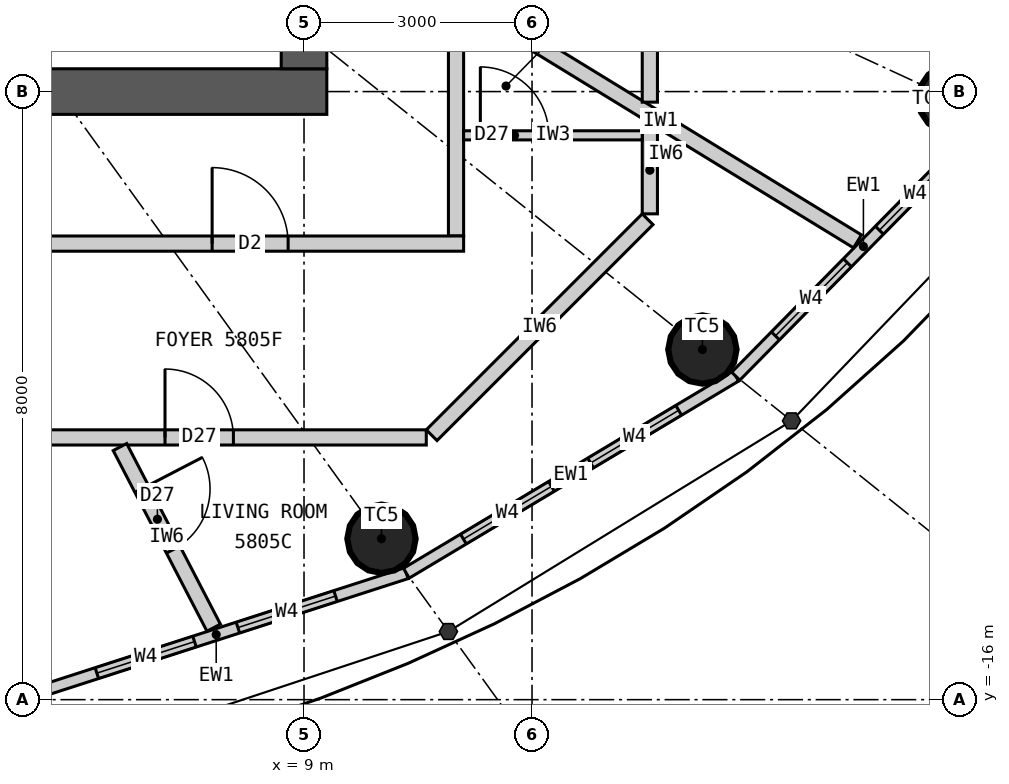
"""IFC4 building model, lengths in metres.
Left out: names, types, materials, properties, quantities, classifications, styles, units other than length and angle.
Written with IfcOpenShell. Run it as: python <this file> out.ifc"""

import sys

from ifc_helpers import new_model, si_unit, direction, frame, frame_2d, origin, origin_2d, place, context, subcontext, project, spatial, rectangle, circle, extrude, element, fill, save


model = new_model("IFC4")
c1 = context("Model", 3, precision=1e-05, world=origin(), true_north=direction((0.0, 1.0)))
c2 = subcontext(c1, "Body", "Model", "MODEL_VIEW")
j1 = project(units=[si_unit("LENGTHUNIT", "METRE"), si_unit("PLANEANGLEUNIT", "RADIAN")], contexts=[c1])
p1 = place(None, origin())
s1 = spatial("IfcSite", under=j1, at=p1, CompositionType="ELEMENT")
p2 = place(p1, origin())
s2 = spatial("IfcBuilding", under=s1, at=p2, CompositionType="ELEMENT")
p3 = place(p2, frame((0.0, 0.0, 216.0)))
s3 = spatial("IfcBuildingStorey", under=s2, at=p3, CompositionType="ELEMENT", Elevation=216.0)
for number, where, z_axis, x_axis in (
    (1, (10.019, -13.883, 0.0), (0.0, 0.0, 1.0), (1.0, 0.0, 0.0)),
    (2, (14.241, -11.393, 0.0), (0.0, 0.0, 1.0), (1.0, 0.0, 0.0)),
    (3, (17.532, -8.098, 0.0), (0.0, 0.0, 1.0), (1.0, 0.0, 0.0)),
):
    element("IfcColumn", number, at=place(p3, frame(where, z_axis=z_axis, x_axis=x_axis)), inside=s3, PredefinedType="COLUMN", context=c2, shape_type="SweptSolid", body=[
        extrude(circle(Radius=0.45, at=origin_2d()), origin(), (0.0, 0.0, 1.0), 3.3),
    ])
p4 = place(p3, frame((9.3, -8.0, 0.0), z_axis=(0.0, 0.0, 1.0), x_axis=(-1.0, 0.0, 0.0)))
e4 = element("IfcWall", 4, at=p4, inside=s3, PredefinedType="SHEAR", context=c2, shape_type="SweptSolid", body=[
    extrude(rectangle(XDim=18.6, YDim=0.6, at=frame_2d((9.3, 0.0))), origin(), (0.0, 0.0, 1.0), 3.3),
])
p5 = place(p4, frame((8.0, 0.0, 0.0)))
e5 = element("IfcOpeningElement", 5, at=p5, cuts=e4, PredefinedType="OPENING", context=c2, shape_type="SweptSolid", body=[
    extrude(rectangle(XDim=1.2, YDim=2.2, at=frame_2d((0.6, 1.1))), frame((0.0, 0.31, 0.0), z_axis=(0.0, -1.0, 0.0), x_axis=(1.0, 0.0, 0.0)), (0.0, 0.0, 1.0), 0.62),
])
p6 = place(p4, frame((15.6, 0.0, 0.0)))
e6 = element("IfcOpeningElement", 6, at=p6, cuts=e4, PredefinedType="OPENING", context=c2, shape_type="SweptSolid", body=[
    extrude(rectangle(XDim=0.9, YDim=2.2, at=frame_2d((0.45, 1.1))), frame((0.0, 0.31, 0.0), z_axis=(0.0, -1.0, 0.0), x_axis=(1.0, 0.0, 0.0)), (0.0, 0.0, 1.0), 0.62),
])
p7 = place(p3, frame((9.0, -7.7, 0.0), z_axis=(0.0, 0.0, 1.0), x_axis=(0.0, 1.0, 0.0)))
e7 = element("IfcWall", 7, at=p7, inside=s3, PredefinedType="SHEAR", context=c2, shape_type="SweptSolid", body=[
    extrude(rectangle(XDim=15.4, YDim=0.6, at=frame_2d((7.7, 0.0))), origin(), (0.0, 0.0, 1.0), 3.3),
])
p8 = place(p7, frame((6.8, 0.0, 0.0)))
e8 = element("IfcOpeningElement", 8, at=p8, cuts=e7, PredefinedType="OPENING", context=c2, shape_type="SweptSolid", body=[
    extrude(rectangle(XDim=1.8, YDim=2.2, at=frame_2d((0.9, 1.1))), frame((0.0, 0.31, 0.0), z_axis=(0.0, -1.0, 0.0), x_axis=(1.0, 0.0, 0.0)), (0.0, 0.0, 1.0), 0.62),
])
p9 = place(p3, frame((5.343, -15.952, 0.0), z_axis=(0.0, 0.0, 1.0), x_axis=(0.951644702515, 0.307200846638, 0.0)))
e9 = element("IfcWall", 9, at=p9, inside=s3, PredefinedType="ELEMENTEDWALL", context=c2, shape_type="SweptSolid", body=[
    extrude(rectangle(XDim=5.258, YDim=0.15, at=frame_2d((2.629, 0.0))), origin(), (0.0, 0.0, 1.0), 3.12),
])
p10 = place(p9, frame((0.979, 0.0, 0.9)))
e10 = element("IfcOpeningElement", 10, at=p10, cuts=e9, PredefinedType="OPENING", context=c2, shape_type="SweptSolid", body=[
    extrude(rectangle(XDim=1.35, YDim=1.9, at=frame_2d((0.675, 0.95))), frame((0.0, 0.085, 0.0), z_axis=(0.0, -1.0, 0.0), x_axis=(1.0, 0.0, 0.0)), (0.0, 0.0, 1.0), 0.17),
])
p11 = place(p9, frame((2.929, 0.0, 0.9)))
e11 = element("IfcOpeningElement", 11, at=p11, cuts=e9, PredefinedType="OPENING", context=c2, shape_type="SweptSolid", body=[
    extrude(rectangle(XDim=1.35, YDim=1.9, at=frame_2d((0.675, 0.95))), frame((0.0, 0.085, 0.0), z_axis=(0.0, -1.0, 0.0), x_axis=(1.0, 0.0, 0.0)), (0.0, 0.0, 1.0), 0.17),
])
p12 = place(p3, frame((10.346, -14.336, 0.0), z_axis=(0.0, 0.0, 1.0), x_axis=(0.85822150553, 0.513279502265, 0.0)))
e12 = element("IfcWall", 12, at=p12, inside=s3, PredefinedType="ELEMENTEDWALL", context=c2, shape_type="SweptSolid", body=[
    extrude(rectangle(XDim=5.05, YDim=0.15, at=frame_2d((2.525, 0.0))), origin(), (0.0, 0.0, 1.0), 3.12),
])
p13 = place(p12, frame((0.875, 0.0, 0.9)))
e13 = element("IfcOpeningElement", 13, at=p13, cuts=e12, PredefinedType="OPENING", context=c2, shape_type="SweptSolid", body=[
    extrude(rectangle(XDim=1.35, YDim=1.9, at=frame_2d((0.675, 0.95))), frame((0.0, 0.085, 0.0), z_axis=(0.0, -1.0, 0.0), x_axis=(1.0, 0.0, 0.0)), (0.0, 0.0, 1.0), 0.17),
])
p14 = place(p12, frame((2.825, 0.0, 0.9)))
e14 = element("IfcOpeningElement", 14, at=p14, cuts=e12, PredefinedType="OPENING", context=c2, shape_type="SweptSolid", body=[
    extrude(rectangle(XDim=1.35, YDim=1.9, at=frame_2d((0.675, 0.95))), frame((0.0, 0.085, 0.0), z_axis=(0.0, -1.0, 0.0), x_axis=(1.0, 0.0, 0.0)), (0.0, 0.0, 1.0), 0.17),
])
p15 = place(p3, frame((14.68, -11.744, 0.0), z_axis=(0.0, 0.0, 1.0), x_axis=(0.701527379618, 0.712642501993, 0.0)))
e15 = element("IfcWall", 15, at=p15, inside=s3, PredefinedType="ELEMENTEDWALL", context=c2, shape_type="SweptSolid", body=[
    extrude(rectangle(XDim=4.788, YDim=0.15, at=frame_2d((2.394, 0.0))), origin(), (0.0, 0.0, 1.0), 3.12),
])
p16 = place(p15, frame((0.744, 0.0, 0.9)))
e16 = element("IfcOpeningElement", 16, at=p16, cuts=e15, PredefinedType="OPENING", context=c2, shape_type="SweptSolid", body=[
    extrude(rectangle(XDim=1.35, YDim=1.9, at=frame_2d((0.675, 0.95))), frame((0.0, 0.085, 0.0), z_axis=(0.0, -1.0, 0.0), x_axis=(1.0, 0.0, 0.0)), (0.0, 0.0, 1.0), 0.17),
])
p17 = place(p15, frame((2.694, 0.0, 0.9)))
e17 = element("IfcOpeningElement", 17, at=p17, cuts=e15, PredefinedType="OPENING", context=c2, shape_type="SweptSolid", body=[
    extrude(rectangle(XDim=1.35, YDim=1.9, at=frame_2d((0.675, 0.95))), frame((0.0, 0.085, 0.0), z_axis=(0.0, -1.0, 0.0), x_axis=(1.0, 0.0, 0.0)), (0.0, 0.0, 1.0), 0.17),
])
p18 = place(p3, frame((11.0, -9.9, 0.0), z_axis=(0.0, 0.0, 1.0), x_axis=(0.0, 1.0, 0.0)))
e18 = element("IfcWall", 18, at=p18, inside=s3, PredefinedType="PARTITIONING", context=c2, shape_type="SweptSolid", body=[
    extrude(rectangle(XDim=7.416, YDim=0.2, at=frame_2d((3.708, 0.0))), origin(), (0.0, 0.0, 1.0), 3.12),
])
p19 = place(p3, frame((11.1, -10.0, 0.0), z_axis=(0.0, 0.0, 1.0), x_axis=(-1.0, 0.0, 0.0)))
e19 = element("IfcWall", 19, at=p19, inside=s3, PredefinedType="PARTITIONING", context=c2, shape_type="SweptSolid", body=[
    extrude(rectangle(XDim=22.2, YDim=0.2, at=frame_2d((11.1, 0.0))), origin(), (0.0, 0.0, 1.0), 3.12),
])
p20 = place(p19, frame((18.864, 0.0, 0.0)))
e20 = element("IfcOpeningElement", 20, at=p20, cuts=e19, PredefinedType="OPENING", context=c2, shape_type="SweptSolid", body=[
    extrude(rectangle(XDim=1.0, YDim=2.2, at=frame_2d((0.5, 1.1))), frame((0.0, 0.11, 0.0), z_axis=(0.0, -1.0, 0.0), x_axis=(1.0, 0.0, 0.0)), (0.0, 0.0, 1.0), 0.22),
])
p21 = place(p19, frame((2.309, 0.0, 0.0)))
e21 = element("IfcOpeningElement", 21, at=p21, cuts=e19, PredefinedType="OPENING", context=c2, shape_type="SweptSolid", body=[
    extrude(rectangle(XDim=1.0, YDim=2.2, at=frame_2d((0.5, 1.1))), frame((0.0, 0.11, 0.0), z_axis=(0.0, -1.0, 0.0), x_axis=(1.0, 0.0, 0.0)), (0.0, 0.0, 1.0), 0.22),
])
p22 = place(p3, frame((11.1, -6.797, 0.0), z_axis=(0.0, 0.0, 1.0), x_axis=(0.852799818179, -0.522237943963, 0.0)))
e22 = element("IfcWall", 22, at=p22, inside=s3, PredefinedType="PARTITIONING", context=c2, shape_type="SweptSolid", body=[
    extrude(rectangle(XDim=6.077, YDim=0.2, at=frame_2d((3.039, 0.0))), origin(), (0.0, 0.0, 1.0), 3.12),
])
p23 = place(p3, frame((0.101, -12.55, 0.0), z_axis=(0.0, 0.0, 1.0), x_axis=(1.0, 0.0, 0.0)))
e23 = element("IfcWall", 23, at=p23, inside=s3, PredefinedType="PARTITIONING", context=c2, shape_type="SweptSolid", body=[
    extrude(rectangle(XDim=10.508, YDim=0.2, at=frame_2d((5.254, 0.0))), origin(), (0.0, 0.0, 1.0), 3.12),
])
p24 = place(p23, frame((1.4, 0.0, 0.0)))
e24 = element("IfcOpeningElement", 24, at=p24, cuts=e23, PredefinedType="OPENING", context=c2, shape_type="SweptSolid", body=[
    extrude(rectangle(XDim=0.8, YDim=2.1, at=frame_2d((0.4, 1.05))), frame((0.0, 0.11, 0.0), z_axis=(0.0, -1.0, 0.0), x_axis=(1.0, 0.0, 0.0)), (0.0, 0.0, 1.0), 0.22),
])
p25 = place(p23, frame((7.07, 0.0, 0.0)))
e25 = element("IfcOpeningElement", 25, at=p25, cuts=e23, PredefinedType="OPENING", context=c2, shape_type="SweptSolid", body=[
    extrude(rectangle(XDim=0.9, YDim=2.1, at=frame_2d((0.45, 1.05))), frame((0.0, 0.11, 0.0), z_axis=(0.0, -1.0, 0.0), x_axis=(1.0, 0.0, 0.0)), (0.0, 0.0, 1.0), 0.22),
])
p26 = place(p3, frame((10.679, -12.521, 0.0), z_axis=(0.0, 0.0, 1.0), x_axis=(0.707106781187, 0.707106781187, 0.0)))
e26 = element("IfcWall", 26, at=p26, inside=s3, PredefinedType="PARTITIONING", context=c2, shape_type="SweptSolid", body=[
    extrude(rectangle(XDim=4.019, YDim=0.2, at=frame_2d((2.009, 0.0))), origin(), (0.0, 0.0, 1.0), 3.12),
])
p27 = place(p3, frame((13.55, -9.609, 0.0), z_axis=(0.0, 0.0, 1.0), x_axis=(0.0, 1.0, 0.0)))
e27 = element("IfcWall", 27, at=p27, inside=s3, PredefinedType="PARTITIONING", context=c2, shape_type="SweptSolid", body=[
    extrude(rectangle(XDim=1.148, YDim=0.2, at=frame_2d((0.574, 0.0))), origin(), (0.0, 0.0, 1.0), 3.12),
])
p28 = place(p3, frame((6.578, -12.677, 0.0), z_axis=(0.0, 0.0, 1.0), x_axis=(0.460620531465, -0.887597164255, 0.0)))
e28 = element("IfcWall", 28, at=p28, inside=s3, PredefinedType="PARTITIONING", context=c2, shape_type="SweptSolid", body=[
    extrude(rectangle(XDim=2.678, YDim=0.2, at=frame_2d((1.339, 0.0))), origin(), (0.0, 0.0, 1.0), 3.12),
])
p29 = place(p28, frame((0.62, 0.0, 0.0)))
e29 = element("IfcOpeningElement", 29, at=p29, cuts=e28, PredefinedType="OPENING", context=c2, shape_type="SweptSolid", body=[
    extrude(rectangle(XDim=0.9, YDim=2.1, at=frame_2d((0.45, 1.05))), frame((0.0, 0.11, 0.0), z_axis=(0.0, -1.0, 0.0), x_axis=(1.0, 0.0, 0.0)), (0.0, 0.0, 1.0), 0.22),
])
p30 = place(p3, frame((11.1, -8.576, 0.0), z_axis=(0.0, 0.0, 1.0), x_axis=(1.0, 0.0, 0.0)))
e30 = element("IfcWall", 30, at=p30, inside=s3, PredefinedType="PARTITIONING", context=c2, shape_type="SweptSolid", body=[
    extrude(rectangle(XDim=2.35, YDim=0.12, at=frame_2d((1.175, 0.0))), origin(), (0.0, 0.0, 1.0), 3.12),
])
p31 = place(p30, frame((0.22, 0.0, 0.0)))
e31 = element("IfcOpeningElement", 31, at=p31, cuts=e30, PredefinedType="OPENING", context=c2, shape_type="SweptSolid", body=[
    extrude(rectangle(XDim=0.9, YDim=2.1, at=frame_2d((0.45, 1.05))), frame((0.0, 0.07, 0.0), z_axis=(0.0, -1.0, 0.0), x_axis=(1.0, 0.0, 0.0)), (0.0, 0.0, 1.0), 0.14),
])
p32 = place(p3, frame((13.55, -8.139, 0.0), z_axis=(0.0, 0.0, 1.0), x_axis=(0.0, 1.0, 0.0)))
e32 = element("IfcWall", 32, at=p32, inside=s3, PredefinedType="PARTITIONING", context=c2, shape_type="SweptSolid", body=[
    extrude(rectangle(XDim=12.496, YDim=0.2, at=frame_2d((6.248, 0.0))), origin(), (0.0, 0.0, 1.0), 3.12),
])
p33 = place(p32, frame((2.42, 0.0, 0.0)))
e33 = element("IfcOpeningElement", 33, at=p33, cuts=e32, PredefinedType="OPENING", context=c2, shape_type="SweptSolid", body=[
    extrude(rectangle(XDim=0.8, YDim=2.1, at=frame_2d((0.4, 1.05))), frame((0.0, 0.11, 0.0), z_axis=(0.0, -1.0, 0.0), x_axis=(1.0, 0.0, 0.0)), (0.0, 0.0, 1.0), 0.22),
])
p34 = place(p32, frame((9.776, 0.0, 0.0)))
e34 = element("IfcOpeningElement", 34, at=p34, cuts=e32, PredefinedType="OPENING", context=c2, shape_type="SweptSolid", body=[
    extrude(rectangle(XDim=0.8, YDim=2.1, at=frame_2d((0.4, 1.05))), frame((0.0, 0.11, 0.0), z_axis=(0.0, -1.0, 0.0), x_axis=(1.0, 0.0, 0.0)), (0.0, 0.0, 1.0), 0.22),
])
p35 = place(p32, frame((5.82, 0.0, 0.0)))
e35 = element("IfcOpeningElement", 35, at=p35, cuts=e32, PredefinedType="OPENING", context=c2, shape_type="SweptSolid", body=[
    extrude(rectangle(XDim=0.9, YDim=2.1, at=frame_2d((0.45, 1.05))), frame((0.0, 0.11, 0.0), z_axis=(0.0, -1.0, 0.0), x_axis=(1.0, 0.0, 0.0)), (0.0, 0.0, 1.0), 0.22),
])
p36 = place(p10, origin())
e36 = element("IfcWindow", 36, at=p36, inside=s3, PartitioningType="SINGLE_PANEL", PredefinedType="WINDOW", context=c2, shape_type="SweptSolid", body=[
    extrude(rectangle(XDim=1.35, YDim=1.9, at=frame_2d((0.675, 0.95))), frame((0.0, 0.03, 0.0), z_axis=(0.0, -1.0, 0.0), x_axis=(1.0, 0.0, 0.0)), (0.0, 0.0, 1.0), 0.06),
])
fill(e10, e36)
p37 = place(p11, origin())
e37 = element("IfcWindow", 37, at=p37, inside=s3, PartitioningType="SINGLE_PANEL", PredefinedType="WINDOW", context=c2, shape_type="SweptSolid", body=[
    extrude(rectangle(XDim=1.35, YDim=1.9, at=frame_2d((0.675, 0.95))), frame((0.0, 0.03, 0.0), z_axis=(0.0, -1.0, 0.0), x_axis=(1.0, 0.0, 0.0)), (0.0, 0.0, 1.0), 0.06),
])
fill(e11, e37)
p38 = place(p13, origin())
e38 = element("IfcWindow", 38, at=p38, inside=s3, PartitioningType="SINGLE_PANEL", PredefinedType="WINDOW", context=c2, shape_type="SweptSolid", body=[
    extrude(rectangle(XDim=1.35, YDim=1.9, at=frame_2d((0.675, 0.95))), frame((0.0, 0.03, 0.0), z_axis=(0.0, -1.0, 0.0), x_axis=(1.0, 0.0, 0.0)), (0.0, 0.0, 1.0), 0.06),
])
fill(e13, e38)
p39 = place(p14, origin())
e39 = element("IfcWindow", 39, at=p39, inside=s3, PartitioningType="SINGLE_PANEL", PredefinedType="WINDOW", context=c2, shape_type="SweptSolid", body=[
    extrude(rectangle(XDim=1.35, YDim=1.9, at=frame_2d((0.675, 0.95))), frame((0.0, 0.03, 0.0), z_axis=(0.0, -1.0, 0.0), x_axis=(1.0, 0.0, 0.0)), (0.0, 0.0, 1.0), 0.06),
])
fill(e14, e39)
p40 = place(p16, origin())
e40 = element("IfcWindow", 40, at=p40, inside=s3, PartitioningType="SINGLE_PANEL", PredefinedType="WINDOW", context=c2, shape_type="SweptSolid", body=[
    extrude(rectangle(XDim=1.35, YDim=1.9, at=frame_2d((0.675, 0.95))), frame((0.0, 0.03, 0.0), z_axis=(0.0, -1.0, 0.0), x_axis=(1.0, 0.0, 0.0)), (0.0, 0.0, 1.0), 0.06),
])
fill(e16, e40)
p41 = place(p17, origin())
e41 = element("IfcWindow", 41, at=p41, inside=s3, PartitioningType="SINGLE_PANEL", PredefinedType="WINDOW", context=c2, shape_type="SweptSolid", body=[
    extrude(rectangle(XDim=1.35, YDim=1.9, at=frame_2d((0.675, 0.95))), frame((0.0, 0.03, 0.0), z_axis=(0.0, -1.0, 0.0), x_axis=(1.0, 0.0, 0.0)), (0.0, 0.0, 1.0), 0.06),
])
fill(e17, e41)
p42 = place(p21, origin())
e42 = element("IfcDoor", 42, at=p42, inside=s3, OperationType="SINGLE_SWING_RIGHT", PredefinedType="DOOR", context=c2, shape_type="SweptSolid", body=[
    extrude(rectangle(XDim=1.0, YDim=2.2, at=frame_2d((0.5, 1.1))), frame((0.0, 0.025, 0.0), z_axis=(0.0, -1.0, 0.0), x_axis=(1.0, 0.0, 0.0)), (0.0, 0.0, 1.0), 0.05),
])
fill(e21, e42)
p43 = place(p31, origin())
e43 = element("IfcDoor", 43, at=p43, inside=s3, OperationType="SINGLE_SWING_LEFT", PredefinedType="DOOR", context=c2, shape_type="SweptSolid", body=[
    extrude(rectangle(XDim=0.9, YDim=2.1, at=frame_2d((0.45, 1.05))), frame((0.0, 0.025, 0.0), z_axis=(0.0, -1.0, 0.0), x_axis=(1.0, 0.0, 0.0)), (0.0, 0.0, 1.0), 0.05),
])
fill(e31, e43)
p44 = place(p25, origin())
e44 = element("IfcDoor", 44, at=p44, inside=s3, OperationType="SINGLE_SWING_LEFT", PredefinedType="DOOR", context=c2, shape_type="SweptSolid", body=[
    extrude(rectangle(XDim=0.9, YDim=2.1, at=frame_2d((0.45, 1.05))), frame((0.0, 0.025, 0.0), z_axis=(0.0, -1.0, 0.0), x_axis=(1.0, 0.0, 0.0)), (0.0, 0.0, 1.0), 0.05),
])
fill(e25, e44)
p45 = place(p29, origin())
e45 = element("IfcDoor", 45, at=p45, inside=s3, OperationType="SINGLE_SWING_LEFT", PredefinedType="DOOR", context=c2, shape_type="SweptSolid", body=[
    extrude(rectangle(XDim=0.9, YDim=2.1, at=frame_2d((0.45, 1.05))), frame((0.0, 0.025, 0.0), z_axis=(0.0, -1.0, 0.0), x_axis=(1.0, 0.0, 0.0)), (0.0, 0.0, 1.0), 0.05),
])
fill(e29, e45)
save(model, sys.argv[1])
